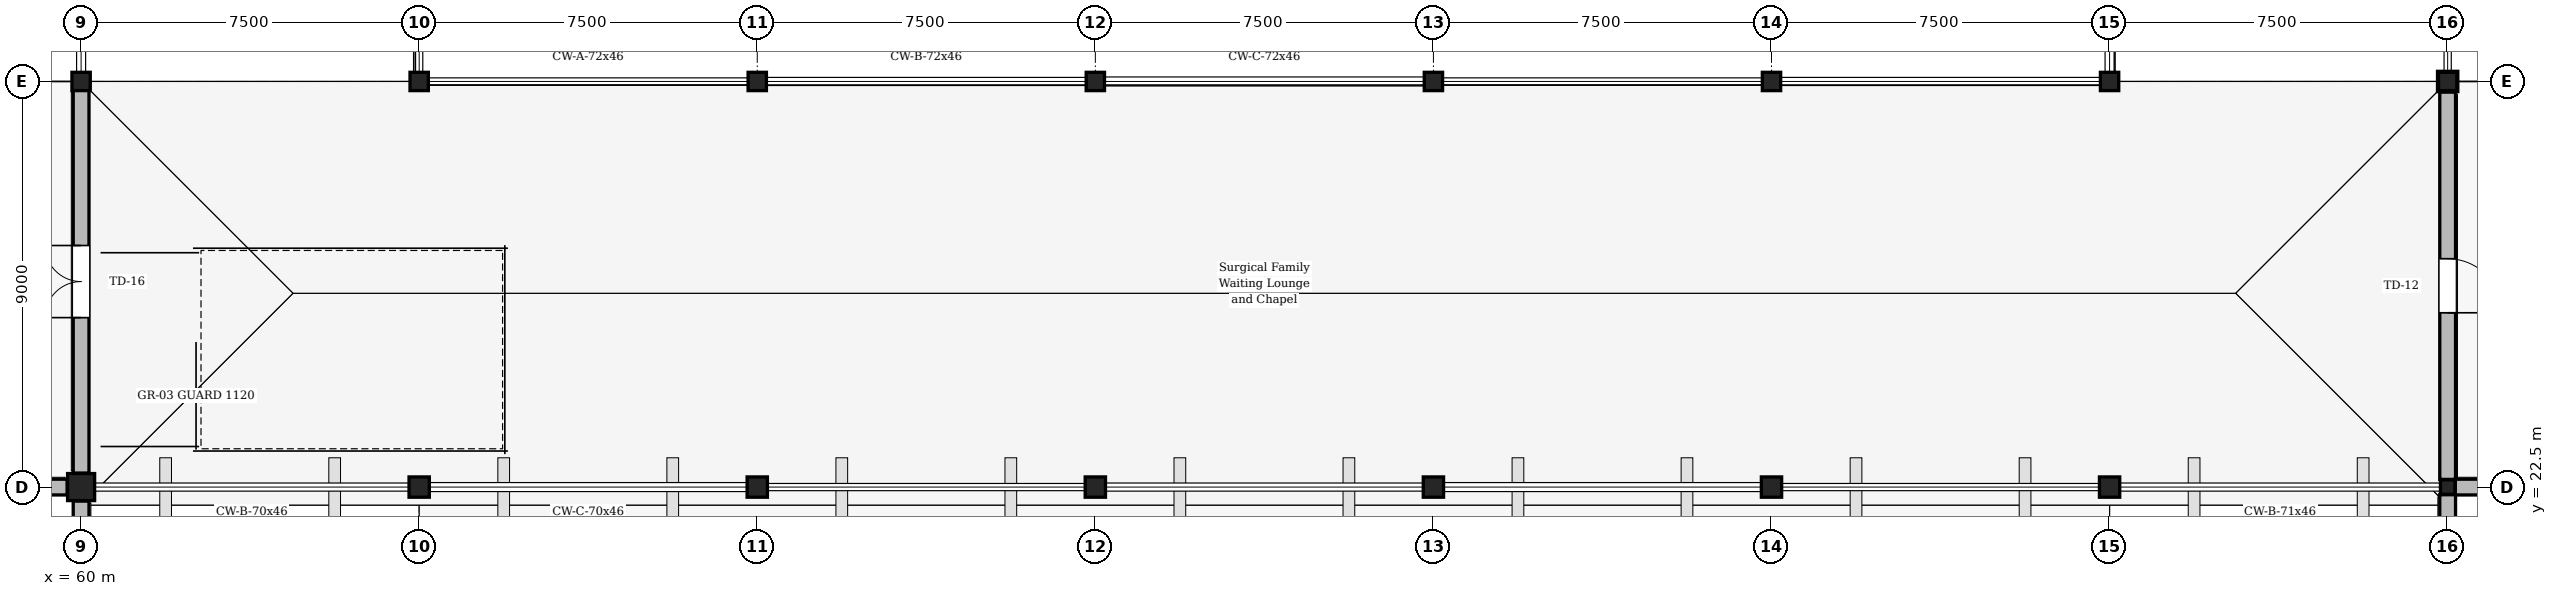
"""IFC4 building model, lengths in metres.
Left out: names, types, materials, properties, quantities, classifications, styles, units other than length and angle.
Written with IfcOpenShell. Run it as: python <this file> out.ifc"""

import sys

from ifc_helpers import new_model, si_unit, direction, frame, frame_2d, origin, origin_2d, place, context, subcontext, project, spatial, rectangle, hollow_circle, i_section, extrude, element, fill, save


model = new_model("IFC4")
c1 = context("Model", 3, precision=1e-05, world=origin(), true_north=direction((0.0, 1.0)))
c2 = subcontext(c1, "Body", "Model", "MODEL_VIEW")
j1 = project(units=[si_unit("LENGTHUNIT", "METRE"), si_unit("PLANEANGLEUNIT", "RADIAN")], contexts=[c1])
p1 = place(None, origin())
s1 = spatial("IfcSite", under=j1, at=p1, CompositionType="ELEMENT")
p2 = place(p1, origin())
s2 = spatial("IfcBuilding", under=s1, at=p2, CompositionType="ELEMENT")
p3 = place(p2, frame((0.0, 0.0, 9.3)))
s3 = spatial("IfcBuildingStorey", under=s2, at=p3, CompositionType="ELEMENT", Elevation=9.3)
p4 = place(p3, frame((60.0, 22.5, 0.0), z_axis=(0.0, 0.0, 1.0), x_axis=(1.0, 0.0, 0.0)))
e1 = element("IfcColumn", 1, at=p4, inside=s3, PredefinedType="COLUMN", context=c2, shape_type="SweptSolid", body=[
    extrude(rectangle(XDim=0.6, YDim=0.6, at=origin_2d()), origin(), (0.0, 0.0, 1.0), 4.8),
])
p5 = place(p3, frame((60.0, 31.5, 0.0), z_axis=(0.0, 0.0, 1.0), x_axis=(1.0, 0.0, 0.0)))
e2 = element("IfcColumn", 2, at=p5, inside=s3, PredefinedType="COLUMN", context=c2, shape_type="SweptSolid", body=[
    extrude(i_section(OverallWidth=0.3, OverallDepth=0.36, WebThickness=0.012, FlangeThickness=0.022, FilletRadius=0.027, at=origin_2d()), origin(), (0.0, 0.0, 1.0), 4.8),
])
p6 = place(p3, frame((67.5, 22.5, 0.0), z_axis=(0.0, 0.0, 1.0), x_axis=(1.0, 0.0, 0.0)))
e3 = element("IfcColumn", 3, at=p6, inside=s3, PredefinedType="COLUMN", context=c2, shape_type="SweptSolid", body=[
    extrude(rectangle(XDim=0.45, YDim=0.45, at=origin_2d()), origin(), (0.0, 0.0, 1.0), 4.8),
])
p7 = place(p3, frame((67.5, 31.5, 0.0), z_axis=(0.0, 0.0, 1.0), x_axis=(1.0, 0.0, 0.0)))
e4 = element("IfcColumn", 4, at=p7, inside=s3, PredefinedType="COLUMN", context=c2, shape_type="SweptSolid", body=[
    extrude(i_section(OverallWidth=0.3, OverallDepth=0.36, WebThickness=0.012, FlangeThickness=0.022, FilletRadius=0.027, at=origin_2d()), origin(), (0.0, 0.0, 1.0), 4.8),
])
p8 = place(p3, frame((75.0, 22.5, 0.0), z_axis=(0.0, 0.0, 1.0), x_axis=(1.0, 0.0, 0.0)))
e5 = element("IfcColumn", 5, at=p8, inside=s3, PredefinedType="COLUMN", context=c2, shape_type="SweptSolid", body=[
    extrude(rectangle(XDim=0.45, YDim=0.45, at=origin_2d()), origin(), (0.0, 0.0, 1.0), 4.8),
])
p9 = place(p3, frame((75.0, 31.5, 0.0), z_axis=(0.0, 0.0, 1.0), x_axis=(1.0, 0.0, 0.0)))
e6 = element("IfcColumn", 6, at=p9, inside=s3, PredefinedType="COLUMN", context=c2, shape_type="SweptSolid", body=[
    extrude(i_section(OverallWidth=0.3, OverallDepth=0.36, WebThickness=0.012, FlangeThickness=0.022, FilletRadius=0.027, at=origin_2d()), origin(), (0.0, 0.0, 1.0), 4.8),
])
p10 = place(p3, frame((82.5, 22.5, 0.0), z_axis=(0.0, 0.0, 1.0), x_axis=(1.0, 0.0, 0.0)))
e7 = element("IfcColumn", 7, at=p10, inside=s3, PredefinedType="COLUMN", context=c2, shape_type="SweptSolid", body=[
    extrude(rectangle(XDim=0.45, YDim=0.45, at=origin_2d()), origin(), (0.0, 0.0, 1.0), 4.8),
])
p11 = place(p3, frame((82.5, 31.5, 0.0), z_axis=(0.0, 0.0, 1.0), x_axis=(1.0, 0.0, 0.0)))
e8 = element("IfcColumn", 8, at=p11, inside=s3, PredefinedType="COLUMN", context=c2, shape_type="SweptSolid", body=[
    extrude(i_section(OverallWidth=0.3, OverallDepth=0.36, WebThickness=0.012, FlangeThickness=0.022, FilletRadius=0.027, at=origin_2d()), origin(), (0.0, 0.0, 1.0), 4.8),
])
p12 = place(p3, frame((90.0, 22.5, 0.0), z_axis=(0.0, 0.0, 1.0), x_axis=(1.0, 0.0, 0.0)))
e9 = element("IfcColumn", 9, at=p12, inside=s3, PredefinedType="COLUMN", context=c2, shape_type="SweptSolid", body=[
    extrude(rectangle(XDim=0.45, YDim=0.45, at=origin_2d()), origin(), (0.0, 0.0, 1.0), 4.8),
])
p13 = place(p3, frame((90.0, 31.5, 0.0), z_axis=(0.0, 0.0, 1.0), x_axis=(1.0, 0.0, 0.0)))
e10 = element("IfcColumn", 10, at=p13, inside=s3, PredefinedType="COLUMN", context=c2, shape_type="SweptSolid", body=[
    extrude(i_section(OverallWidth=0.3, OverallDepth=0.36, WebThickness=0.012, FlangeThickness=0.022, FilletRadius=0.027, at=origin_2d()), origin(), (0.0, 0.0, 1.0), 4.8),
])
p14 = place(p3, frame((97.5, 22.5, 0.0), z_axis=(0.0, 0.0, 1.0), x_axis=(1.0, 0.0, 0.0)))
e11 = element("IfcColumn", 11, at=p14, inside=s3, PredefinedType="COLUMN", context=c2, shape_type="SweptSolid", body=[
    extrude(rectangle(XDim=0.45, YDim=0.45, at=origin_2d()), origin(), (0.0, 0.0, 1.0), 4.8),
])
p15 = place(p3, frame((97.5, 31.5, 0.0), z_axis=(0.0, 0.0, 1.0), x_axis=(1.0, 0.0, 0.0)))
e12 = element("IfcColumn", 12, at=p15, inside=s3, PredefinedType="COLUMN", context=c2, shape_type="SweptSolid", body=[
    extrude(i_section(OverallWidth=0.3, OverallDepth=0.36, WebThickness=0.012, FlangeThickness=0.022, FilletRadius=0.027, at=origin_2d()), origin(), (0.0, 0.0, 1.0), 4.8),
])
p16 = place(p3, frame((105.0, 22.5, 0.0), z_axis=(0.0, 0.0, 1.0), x_axis=(1.0, 0.0, 0.0)))
e13 = element("IfcColumn", 13, at=p16, inside=s3, PredefinedType="COLUMN", context=c2, shape_type="SweptSolid", body=[
    extrude(rectangle(XDim=0.45, YDim=0.45, at=origin_2d()), origin(), (0.0, 0.0, 1.0), 4.8),
])
p17 = place(p3, frame((105.0, 31.5, 0.0), z_axis=(0.0, 0.0, 1.0), x_axis=(1.0, 0.0, 0.0)))
e14 = element("IfcColumn", 14, at=p17, inside=s3, PredefinedType="COLUMN", context=c2, shape_type="SweptSolid", body=[
    extrude(i_section(OverallWidth=0.3, OverallDepth=0.36, WebThickness=0.012, FlangeThickness=0.022, FilletRadius=0.027, at=origin_2d()), origin(), (0.0, 0.0, 1.0), 4.8),
])
p18 = place(p3, frame((112.5, 22.5, 0.0), z_axis=(0.0, 0.0, 1.0), x_axis=(1.0, 0.0, 0.0)))
e15 = element("IfcColumn", 15, at=p18, inside=s3, PredefinedType="COLUMN", context=c2, shape_type="SweptSolid", body=[
    extrude(rectangle(XDim=0.32, YDim=0.32, at=origin_2d()), origin(), (0.0, 0.0, 1.0), 4.8),
])
p19 = place(p3, frame((112.5, 31.5, 0.0), z_axis=(0.0, 0.0, 1.0), x_axis=(1.0, 0.0, 0.0)))
e16 = element("IfcColumn", 16, at=p19, inside=s3, PredefinedType="COLUMN", context=c2, shape_type="SweptSolid", body=[
    extrude(rectangle(XDim=0.45, YDim=0.45, at=origin_2d()), origin(), (0.0, 0.0, 1.0), 4.8),
])
p20 = place(p3, frame((60.0, 31.5, 4.8), z_axis=(0.0, 0.0, 1.0), x_axis=(1.0, 0.0, 0.0)))
e17 = element("IfcColumn", 17, at=p20, inside=s3, PredefinedType="COLUMN", context=c2, shape_type="SweptSolid", body=[
    extrude(hollow_circle(Radius=0.203, WallThickness=0.016, at=origin_2d()), origin(), (0.0, 0.0, 1.0), 2.75),
])
p21 = place(p3, frame((67.5, 31.5, 4.8), z_axis=(0.0, 0.0, 1.0), x_axis=(1.0, 0.0, 0.0)))
e18 = element("IfcColumn", 18, at=p21, inside=s3, PredefinedType="COLUMN", context=c2, shape_type="SweptSolid", body=[
    extrude(hollow_circle(Radius=0.203, WallThickness=0.016, at=origin_2d()), origin(), (0.0, 0.0, 1.0), 4.415),
])
p22 = place(p3, frame((75.0, 31.5, 4.8), z_axis=(0.0, 0.0, 1.0), x_axis=(1.0, 0.0, 0.0)))
e19 = element("IfcColumn", 19, at=p22, inside=s3, PredefinedType="COLUMN", context=c2, shape_type="SweptSolid", body=[
    extrude(hollow_circle(Radius=0.203, WallThickness=0.016, at=origin_2d()), origin(), (0.0, 0.0, 1.0), 5.525),
])
for number, where, z_axis, x_axis in (
    (20, (82.5, 31.5, 4.8), (0.0, 0.0, 1.0), (1.0, 0.0, 0.0)),
    (21, (90.0, 31.5, 4.8), (0.0, 0.0, 1.0), (1.0, 0.0, 0.0)),
):
    element("IfcColumn", number, at=place(p3, frame(where, z_axis=z_axis, x_axis=x_axis)), inside=s3, PredefinedType="COLUMN", context=c2, shape_type="SweptSolid", body=[
        extrude(hollow_circle(Radius=0.203, WallThickness=0.016, at=origin_2d()), origin(), (0.0, 0.0, 1.0), 6.081),
    ])
p23 = place(p3, frame((97.5, 31.5, 4.8), z_axis=(0.0, 0.0, 1.0), x_axis=(1.0, 0.0, 0.0)))
e22 = element("IfcColumn", 22, at=p23, inside=s3, PredefinedType="COLUMN", context=c2, shape_type="SweptSolid", body=[
    extrude(hollow_circle(Radius=0.203, WallThickness=0.016, at=origin_2d()), origin(), (0.0, 0.0, 1.0), 5.525),
])
p24 = place(p3, frame((105.0, 31.5, 4.8), z_axis=(0.0, 0.0, 1.0), x_axis=(1.0, 0.0, 0.0)))
e23 = element("IfcColumn", 23, at=p24, inside=s3, PredefinedType="COLUMN", context=c2, shape_type="SweptSolid", body=[
    extrude(hollow_circle(Radius=0.203, WallThickness=0.016, at=origin_2d()), origin(), (0.0, 0.0, 1.0), 4.415),
])
p25 = place(p3, frame((112.5, 31.5, 4.8), z_axis=(0.0, 0.0, 1.0), x_axis=(1.0, 0.0, 0.0)))
e24 = element("IfcColumn", 24, at=p25, inside=s3, PredefinedType="COLUMN", context=c2, shape_type="SweptSolid", body=[
    extrude(hollow_circle(Radius=0.203, WallThickness=0.016, at=origin_2d()), origin(), (0.0, 0.0, 1.0), 2.75),
])
p26 = place(p3, frame((52.67, 22.5, 0.0), z_axis=(0.0, 0.0, 1.0), x_axis=(1.0, 0.0, 0.0)))
e25 = element("IfcWall", 25, at=p26, inside=s3, PredefinedType="STANDARD", context=c2, shape_type="SweptSolid", body=[
    extrude(rectangle(XDim=7.02, YDim=0.35, at=frame_2d((3.51, 0.0))), origin(), (0.0, 0.0, 1.0), 3.95),
])
p27 = place(p26, frame((2.91, 0.0, 0.0)))
e26 = element("IfcOpeningElement", 26, at=p27, cuts=e25, PredefinedType="OPENING", context=c2, shape_type="SweptSolid", body=[
    extrude(rectangle(XDim=1.2, YDim=2.3, at=frame_2d((0.6, 1.15))), frame((0.0, 0.185, 0.0), z_axis=(0.0, -1.0, 0.0), x_axis=(1.0, 0.0, 0.0)), (0.0, 0.0, 1.0), 0.37),
])
p28 = place(p3, frame((60.0, 22.19, 0.0), z_axis=(0.0, 0.0, 1.0), x_axis=(0.0, -1.0, 0.0)))
e27 = element("IfcWall", 27, at=p28, inside=s3, PredefinedType="STANDARD", context=c2, shape_type="SweptSolid", body=[
    extrude(rectangle(XDim=6.88, YDim=0.35, at=frame_2d((3.44, 0.0))), origin(), (0.0, 0.0, 1.0), 3.95),
])
p29 = place(p28, frame((2.54, 0.0, 0.9)))
e28 = element("IfcOpeningElement", 28, at=p29, cuts=e27, PredefinedType="OPENING", context=c2, shape_type="SweptSolid", body=[
    extrude(rectangle(XDim=1.8, YDim=2.4, at=frame_2d((0.9, 1.2))), frame((0.0, 0.185, 0.0), z_axis=(0.0, -1.0, 0.0), x_axis=(1.0, 0.0, 0.0)), (0.0, 0.0, 1.0), 0.37),
])
p30 = place(p3, frame((60.0, 22.81, 0.0), z_axis=(0.0, 0.0, 1.0), x_axis=(0.0, 1.0, 0.0)))
e29 = element("IfcWall", 29, at=p30, inside=s3, PredefinedType="STANDARD", context=c2, shape_type="SweptSolid", body=[
    extrude(rectangle(XDim=8.5, YDim=0.35, at=frame_2d((4.25, 0.0))), origin(), (0.0, 0.0, 1.0), 4.55),
])
p31 = place(p30, frame((3.45, 0.0, 0.0)))
e30 = element("IfcOpeningElement", 30, at=p31, cuts=e29, PredefinedType="OPENING", context=c2, shape_type="SweptSolid", body=[
    extrude(rectangle(XDim=1.6, YDim=2.35, at=frame_2d((0.8, 1.175))), frame((0.0, 0.185, 0.0), z_axis=(0.0, -1.0, 0.0), x_axis=(1.0, 0.0, 0.0)), (0.0, 0.0, 1.0), 0.37),
])
p32 = place(p3, frame((112.5, 31.265, 0.0), z_axis=(0.0, 0.0, 1.0), x_axis=(0.0, -1.0, 0.0)))
e31 = element("IfcWall", 31, at=p32, inside=s3, PredefinedType="STANDARD", context=c2, shape_type="SweptSolid", body=[
    extrude(rectangle(XDim=8.595, YDim=0.35, at=frame_2d((4.297, 0.0))), origin(), (0.0, 0.0, 1.0), 4.55),
])
p33 = place(p32, frame((3.698, 0.0, 0.0)))
e32 = element("IfcOpeningElement", 32, at=p33, cuts=e31, PredefinedType="OPENING", context=c2, shape_type="SweptSolid", body=[
    extrude(rectangle(XDim=1.2, YDim=2.3, at=frame_2d((0.6, 1.15))), frame((0.0, 0.185, 0.0), z_axis=(0.0, -1.0, 0.0), x_axis=(1.0, 0.0, 0.0)), (0.0, 0.0, 1.0), 0.37),
])
p34 = place(p3, frame((112.67, 22.5, 0.0), z_axis=(0.0, 0.0, 1.0), x_axis=(1.0, 0.0, 0.0)))
e33 = element("IfcWall", 33, at=p34, inside=s3, PredefinedType="STANDARD", context=c2, shape_type="SweptSolid", body=[
    extrude(rectangle(XDim=7.16, YDim=0.35, at=frame_2d((3.58, 0.0))), origin(), (0.0, 0.0, 1.0), 3.95),
])
p35 = place(p34, frame((2.98, 0.0, 0.0)))
e34 = element("IfcOpeningElement", 34, at=p35, cuts=e33, PredefinedType="OPENING", context=c2, shape_type="SweptSolid", body=[
    extrude(rectangle(XDim=1.2, YDim=2.3, at=frame_2d((0.6, 1.15))), frame((0.0, 0.185, 0.0), z_axis=(0.0, -1.0, 0.0), x_axis=(1.0, 0.0, 0.0)), (0.0, 0.0, 1.0), 0.37),
])
p36 = place(p3, frame((112.5, 15.31, 0.0), z_axis=(0.0, 0.0, 1.0), x_axis=(0.0, 1.0, 0.0)))
e35 = element("IfcWall", 35, at=p36, inside=s3, PredefinedType="STANDARD", context=c2, shape_type="SweptSolid", body=[
    extrude(rectangle(XDim=7.02, YDim=0.35, at=frame_2d((3.51, 0.0))), origin(), (0.0, 0.0, 1.0), 3.95),
])
p37 = place(p36, frame((2.46, 0.0, 0.9)))
e36 = element("IfcOpeningElement", 36, at=p37, cuts=e35, PredefinedType="OPENING", context=c2, shape_type="SweptSolid", body=[
    extrude(rectangle(XDim=2.1, YDim=2.1, at=frame_2d((1.05, 1.05))), frame((0.0, 0.185, 0.0), z_axis=(0.0, -1.0, 0.0), x_axis=(1.0, 0.0, 0.0)), (0.0, 0.0, 1.0), 0.37),
])
p38 = place(p31, origin())
e37 = element("IfcDoor", 37, at=p38, inside=s3, OperationType="DOUBLE_DOOR_SINGLE_SWING", PredefinedType="DOOR", context=c2, shape_type="SweptSolid", body=[
    extrude(rectangle(XDim=1.6, YDim=2.35, at=frame_2d((0.8, 1.175))), frame((0.0, 0.025, 0.0), z_axis=(0.0, -1.0, 0.0), x_axis=(1.0, 0.0, 0.0)), (0.0, 0.0, 1.0), 0.05),
])
fill(e30, e37)
p39 = place(p33, origin())
e38 = element("IfcDoor", 38, at=p39, inside=s3, OperationType="SINGLE_SWING_RIGHT", PredefinedType="DOOR", context=c2, shape_type="SweptSolid", body=[
    extrude(rectangle(XDim=1.2, YDim=2.3, at=frame_2d((0.6, 1.15))), frame((0.0, 0.025, 0.0), z_axis=(0.0, -1.0, 0.0), x_axis=(1.0, 0.0, 0.0)), (0.0, 0.0, 1.0), 0.05),
])
fill(e32, e38)
save(model, sys.argv[1])
